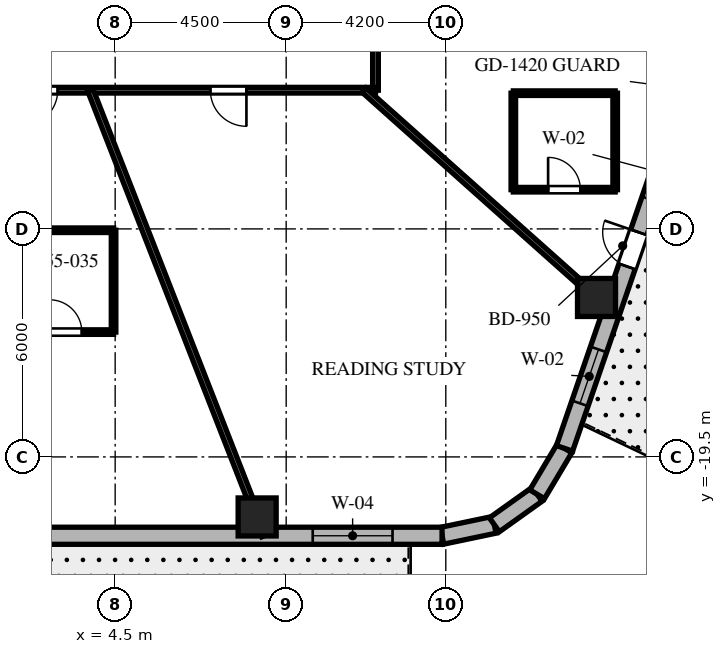
"""IFC4 building model, lengths in metres.
Left out: names, types, materials, properties, quantities, classifications, styles, units other than length and angle.
Written with IfcOpenShell. Run it as: python <this file> out.ifc"""

import sys

from ifc_helpers import new_model, si_unit, direction, frame, frame_2d, origin, origin_2d, place, context, subcontext, project, spatial, rectangle, extrude, element, fill, save


model = new_model("IFC4")
c1 = context("Model", 3, precision=1e-05, world=origin(), true_north=direction((0.0, 1.0)))
c2 = subcontext(c1, "Body", "Model", "MODEL_VIEW")
j1 = project(units=[si_unit("LENGTHUNIT", "METRE"), si_unit("PLANEANGLEUNIT", "RADIAN")], contexts=[c1])
p1 = place(None, origin())
s1 = spatial("IfcSite", under=j1, at=p1, CompositionType="ELEMENT")
p2 = place(p1, origin())
s2 = spatial("IfcBuilding", under=s1, at=p2, CompositionType="ELEMENT")
p3 = place(p2, frame((0.0, 0.0, 221.7)))
s3 = spatial("IfcBuildingStorey", under=s2, at=p3, CompositionType="ELEMENT", Elevation=221.7)
for number, where, z_axis, x_axis in (
    (1, (8.236, -21.08, 0.0), (0.0, 0.0, 1.0), (1.0, 0.0, 0.0)),
    (2, (17.166, -15.304, 0.0), (0.0, 0.0, 1.0), (1.0, 0.0, 0.0)),
):
    element("IfcColumn", number, at=place(p3, frame(where, z_axis=z_axis, x_axis=x_axis)), inside=s3, PredefinedType="COLUMN", context=c2, shape_type="SweptSolid", body=[
        extrude(rectangle(XDim=1.0, YDim=1.0, at=origin_2d()), origin(), (0.0, 0.0, 1.0), 3.8),
    ])
p4 = place(p3, frame((13.102, -21.575, 0.0), z_axis=(0.0, 0.0, 1.0), x_axis=(0.978757421505, 0.205021730188, 0.0)))
e3 = element("IfcWall", 3, at=p4, inside=s3, PredefinedType="SOLIDWALL", context=c2, shape_type="SweptSolid", body=[
    extrude(rectangle(XDim=1.406, YDim=0.45, at=frame_2d((0.703, 0.0))), origin(), (0.0, 0.0, 1.0), 3.5),
])
p5 = place(p3, frame((14.478, -21.287, 0.0), z_axis=(0.0, 0.0, 1.0), x_axis=(0.813888518617, 0.58102106611, 0.0)))
e4 = element("IfcWall", 4, at=p5, inside=s3, PredefinedType="SOLIDWALL", context=c2, shape_type="SweptSolid", body=[
    extrude(rectangle(XDim=1.383, YDim=0.45, at=frame_2d((0.691, 0.0))), origin(), (0.0, 0.0, 1.0), 3.5),
])
p6 = place(p3, frame((15.604, -20.483, 0.0), z_axis=(0.0, 0.0, 1.0), x_axis=(0.512222149036, 0.858852996756, 0.0)))
e5 = element("IfcWall", 5, at=p6, inside=s3, PredefinedType="SOLIDWALL", context=c2, shape_type="SweptSolid", body=[
    extrude(rectangle(XDim=1.406, YDim=0.45, at=frame_2d((0.703, 0.0))), origin(), (0.0, 0.0, 1.0), 3.5),
])
p7 = place(p3, frame((-11.298, -21.575, 0.0), z_axis=(0.0, 0.0, 1.0), x_axis=(1.0, 0.0, 0.0)))
e6 = element("IfcWall", 6, at=p7, inside=s3, PredefinedType="SOLIDWALL", context=c2, shape_type="SweptSolid", body=[
    extrude(rectangle(XDim=24.399, YDim=0.45, at=frame_2d((12.2, 0.0))), origin(), (0.0, 0.0, 1.0), 3.5),
])
p8 = place(p7, frame((2.55, 0.0, 0.0)))
e7 = element("IfcOpeningElement", 7, at=p8, cuts=e6, PredefinedType="OPENING", context=c2, shape_type="SweptSolid", body=[
    extrude(rectangle(XDim=1.0, YDim=2.15, at=frame_2d((0.5, 1.075))), frame((0.0, 0.235, 0.0), z_axis=(0.0, -1.0, 0.0), x_axis=(1.0, 0.0, 0.0)), (0.0, 0.0, 1.0), 0.47),
])
p9 = place(p7, frame((11.151, 0.0, 0.8)))
e8 = element("IfcOpeningElement", 8, at=p9, cuts=e6, PredefinedType="OPENING", context=c2, shape_type="SweptSolid", body=[
    extrude(rectangle(XDim=2.1, YDim=1.85, at=frame_2d((1.05, 0.925))), frame((0.0, 0.235, 0.0), z_axis=(0.0, -1.0, 0.0), x_axis=(1.0, 0.0, 0.0)), (0.0, 0.0, 1.0), 0.47),
])
p10 = place(p7, frame((20.996, 0.0, 0.8)))
e9 = element("IfcOpeningElement", 9, at=p10, cuts=e6, PredefinedType="OPENING", context=c2, shape_type="SweptSolid", body=[
    extrude(rectangle(XDim=2.1, YDim=1.85, at=frame_2d((1.05, 0.925))), frame((0.0, 0.235, 0.0), z_axis=(0.0, -1.0, 0.0), x_axis=(1.0, 0.0, 0.0)), (0.0, 0.0, 1.0), 0.47),
])
p11 = place(p3, frame((16.324, -19.275, 0.0), z_axis=(0.0, 0.0, 1.0), x_axis=(0.325083142304, 0.945685439557, 0.0)))
e10 = element("IfcWall", 10, at=p11, inside=s3, PredefinedType="SOLIDWALL", context=c2, shape_type="SweptSolid", body=[
    extrude(rectangle(XDim=20.224, YDim=0.45, at=frame_2d((10.112, 0.0))), origin(), (0.0, 0.0, 1.0), 3.5),
])
p12 = place(p11, frame((5.062, 0.0, 0.0)))
e11 = element("IfcOpeningElement", 11, at=p12, cuts=e10, PredefinedType="OPENING", context=c2, shape_type="SweptSolid", body=[
    extrude(rectangle(XDim=0.95, YDim=2.15, at=frame_2d((0.475, 1.075))), frame((0.0, 0.235, 0.0), z_axis=(0.0, -1.0, 0.0), x_axis=(1.0, 0.0, 0.0)), (0.0, 0.0, 1.0), 0.47),
])
p13 = place(p11, frame((1.253, 0.0, 0.8)))
e12 = element("IfcOpeningElement", 12, at=p13, cuts=e10, PredefinedType="OPENING", context=c2, shape_type="SweptSolid", body=[
    extrude(rectangle(XDim=1.5, YDim=1.8, at=frame_2d((0.75, 0.9))), frame((0.0, 0.235, 0.0), z_axis=(0.0, -1.0, 0.0), x_axis=(1.0, 0.0, 0.0)), (0.0, 0.0, 1.0), 0.47),
])
p14 = place(p11, frame((6.929, 0.0, 0.8)))
e13 = element("IfcOpeningElement", 13, at=p14, cuts=e10, PredefinedType="OPENING", context=c2, shape_type="SweptSolid", body=[
    extrude(rectangle(XDim=1.5, YDim=1.8, at=frame_2d((0.75, 0.9))), frame((0.0, 0.235, 0.0), z_axis=(0.0, -1.0, 0.0), x_axis=(1.0, 0.0, 0.0)), (0.0, 0.0, 1.0), 0.47),
])
p15 = place(p11, frame((12.612, 0.0, 0.8)))
e14 = element("IfcOpeningElement", 14, at=p15, cuts=e10, PredefinedType="OPENING", context=c2, shape_type="SweptSolid", body=[
    extrude(rectangle(XDim=1.5, YDim=1.8, at=frame_2d((0.75, 0.9))), frame((0.0, 0.235, 0.0), z_axis=(0.0, -1.0, 0.0), x_axis=(1.0, 0.0, 0.0)), (0.0, 0.0, 1.0), 0.47),
])
p16 = place(p11, frame((17.418, 0.0, 0.8)))
e15 = element("IfcOpeningElement", 15, at=p16, cuts=e10, PredefinedType="OPENING", context=c2, shape_type="SweptSolid", body=[
    extrude(rectangle(XDim=1.5, YDim=1.8, at=frame_2d((0.75, 0.9))), frame((0.0, 0.235, 0.0), z_axis=(0.0, -1.0, 0.0), x_axis=(1.0, 0.0, 0.0)), (0.0, 0.0, 1.0), 0.47),
])
p17 = place(p3, frame((11.35, -4.4, 0.0), z_axis=(0.0, 0.0, 1.0), x_axis=(0.0, -1.0, 0.0)))
e16 = element("IfcWall", 16, at=p17, inside=s3, PredefinedType="PARTITIONING", context=c2, shape_type="SweptSolid", body=[
    extrude(rectangle(XDim=5.45, YDim=0.15, at=frame_2d((2.725, 0.0))), origin(), (0.0, 0.0, 1.0), 2.99),
])
p18 = place(p17, frame((2.466, 0.0, 0.0)))
e17 = element("IfcOpeningElement", 17, at=p18, cuts=e16, PredefinedType="OPENING", context=c2, shape_type="SweptSolid", body=[
    extrude(rectangle(XDim=0.95, YDim=2.03, at=frame_2d((0.475, 1.015))), frame((0.0, 0.085, 0.0), z_axis=(0.0, -1.0, 0.0), x_axis=(1.0, 0.0, 0.0)), (0.0, 0.0, 1.0), 0.17),
])
p19 = place(p3, frame((11.35, -9.85, 0.0), z_axis=(0.0, 0.0, 1.0), x_axis=(-1.0, 0.0, 0.0)))
e18 = element("IfcWall", 18, at=p19, inside=s3, PredefinedType="PARTITIONING", context=c2, shape_type="SweptSolid", body=[
    extrude(rectangle(XDim=10.43, YDim=0.15, at=frame_2d((5.215, 0.0))), origin(), (0.0, 0.0, 1.0), 2.99),
])
p20 = place(p19, frame((8.362, 0.0, 0.0)))
e19 = element("IfcOpeningElement", 19, at=p20, cuts=e18, PredefinedType="OPENING", context=c2, shape_type="SweptSolid", body=[
    extrude(rectangle(XDim=0.95, YDim=2.03, at=frame_2d((0.475, 1.015))), frame((0.0, 0.085, 0.0), z_axis=(0.0, -1.0, 0.0), x_axis=(1.0, 0.0, 0.0)), (0.0, 0.0, 1.0), 0.17),
])
p21 = place(p19, frame((3.396, 0.0, 0.0)))
e20 = element("IfcOpeningElement", 20, at=p21, cuts=e18, PredefinedType="OPENING", context=c2, shape_type="SweptSolid", body=[
    extrude(rectangle(XDim=0.95, YDim=2.03, at=frame_2d((0.475, 1.015))), frame((0.0, 0.085, 0.0), z_axis=(0.0, -1.0, 0.0), x_axis=(1.0, 0.0, 0.0)), (0.0, 0.0, 1.0), 0.17),
])
p22 = place(p3, frame((3.848, -9.85, 0.0), z_axis=(0.0, 0.0, 1.0), x_axis=(0.363921778212, -0.931429513889, 0.0)))
e21 = element("IfcWall", 21, at=p22, inside=s3, PredefinedType="PARTITIONING", context=c2, shape_type="SweptSolid", body=[
    extrude(rectangle(XDim=12.588, YDim=0.15, at=frame_2d((6.294, 0.0))), origin(), (0.0, 0.0, 1.0), 2.74),
])
p23 = place(p3, frame((11.048, -9.85, 0.0), z_axis=(0.0, 0.0, 1.0), x_axis=(0.746444434655, -0.665447748492, 0.0)))
e22 = element("IfcWall", 22, at=p23, inside=s3, PredefinedType="PARTITIONING", context=c2, shape_type="SweptSolid", body=[
    extrude(rectangle(XDim=8.732, YDim=0.15, at=frame_2d((4.366, 0.0))), origin(), (0.0, 0.0, 1.0), 2.74),
])
p24 = place(p3, frame((11.35, -5.072, 0.0), z_axis=(0.0, 0.0, 1.0), x_axis=(0.912980177983, -0.408003914944, 0.0)))
e23 = element("IfcWall", 23, at=p24, inside=s3, PredefinedType="PARTITIONING", context=c2, shape_type="SweptSolid", body=[
    extrude(rectangle(XDim=9.358, YDim=0.15, at=frame_2d((4.679, 0.0))), origin(), (0.0, 0.0, 1.0), 2.74),
])
p25 = place(p3, frame((1.938, -16.215, 0.0), z_axis=(0.0, 0.0, 1.0), x_axis=(1.0, 0.0, 0.0)))
e24 = element("IfcWall", 24, at=p25, inside=s3, PredefinedType="PARTITIONING", context=c2, shape_type="SweptSolid", body=[
    extrude(rectangle(XDim=2.52, YDim=0.12, at=frame_2d((1.26, 0.0))), origin(), (0.0, 0.0, 1.0), 3.5),
])
p26 = place(p25, frame((0.835, 0.0, 0.0)))
e25 = element("IfcOpeningElement", 25, at=p26, cuts=e24, PredefinedType="OPENING", context=c2, shape_type="SweptSolid", body=[
    extrude(rectangle(XDim=0.85, YDim=2.03, at=frame_2d((0.425, 1.015))), frame((0.0, 0.07, 0.0), z_axis=(0.0, -1.0, 0.0), x_axis=(1.0, 0.0, 0.0)), (0.0, 0.0, 1.0), 0.14),
])
p27 = place(p3, frame((4.458, -16.215, 0.0), z_axis=(0.0, 0.0, 1.0), x_axis=(0.0, 1.0, 0.0)))
e26 = element("IfcWall", 26, at=p27, inside=s3, PredefinedType="PARTITIONING", context=c2, shape_type="SweptSolid", body=[
    extrude(rectangle(XDim=2.68, YDim=0.12, at=frame_2d((1.34, 0.0))), origin(), (0.0, 0.0, 1.0), 3.027),
])
p28 = place(p3, frame((4.458, -13.535, 0.0), z_axis=(0.0, 0.0, 1.0), x_axis=(-1.0, 0.0, 0.0)))
e27 = element("IfcWall", 27, at=p28, inside=s3, PredefinedType="PARTITIONING", context=c2, shape_type="SweptSolid", body=[
    extrude(rectangle(XDim=2.52, YDim=0.12, at=frame_2d((1.26, 0.0))), origin(), (0.0, 0.0, 1.0), 3.027),
])
p29 = place(p3, frame((14.977, -12.468, 0.0), z_axis=(0.0, 0.0, 1.0), x_axis=(1.0, 0.0, 0.0)))
e28 = element("IfcWall", 28, at=p29, inside=s3, PredefinedType="PARTITIONING", context=c2, shape_type="SweptSolid", body=[
    extrude(rectangle(XDim=2.68, YDim=0.12, at=frame_2d((1.34, 0.0))), origin(), (0.0, 0.0, 1.0), 3.5),
])
p30 = place(p29, frame((0.915, 0.0, 0.0)))
e29 = element("IfcOpeningElement", 29, at=p30, cuts=e28, PredefinedType="OPENING", context=c2, shape_type="SweptSolid", body=[
    extrude(rectangle(XDim=0.85, YDim=2.03, at=frame_2d((0.425, 1.015))), frame((0.0, 0.07, 0.0), z_axis=(0.0, -1.0, 0.0), x_axis=(1.0, 0.0, 0.0)), (0.0, 0.0, 1.0), 0.14),
])
p31 = place(p3, frame((17.657, -12.468, 0.0), z_axis=(0.0, 0.0, 1.0), x_axis=(0.0, 1.0, 0.0)))
e30 = element("IfcWall", 30, at=p31, inside=s3, PredefinedType="PARTITIONING", context=c2, shape_type="SweptSolid", body=[
    extrude(rectangle(XDim=2.54, YDim=0.12, at=frame_2d((1.27, 0.0))), origin(), (0.0, 0.0, 1.0), 3.5),
])
p32 = place(p3, frame((17.657, -9.928, 0.0), z_axis=(0.0, 0.0, 1.0), x_axis=(-1.0, 0.0, 0.0)))
e31 = element("IfcWall", 31, at=p32, inside=s3, PredefinedType="PARTITIONING", context=c2, shape_type="SweptSolid", body=[
    extrude(rectangle(XDim=2.68, YDim=0.12, at=frame_2d((1.34, 0.0))), origin(), (0.0, 0.0, 1.0), 3.073),
])
p33 = place(p3, frame((14.977, -9.928, 0.0), z_axis=(0.0, 0.0, 1.0), x_axis=(0.0, -1.0, 0.0)))
e32 = element("IfcWall", 32, at=p33, inside=s3, PredefinedType="PARTITIONING", context=c2, shape_type="SweptSolid", body=[
    extrude(rectangle(XDim=2.54, YDim=0.12, at=frame_2d((1.27, 0.0))), origin(), (0.0, 0.0, 1.0), 3.073),
])
p34 = place(p10, origin())
e33 = element("IfcWindow", 33, at=p34, inside=s3, PartitioningType="SINGLE_PANEL", PredefinedType="WINDOW", context=c2, shape_type="SweptSolid", body=[
    extrude(rectangle(XDim=2.1, YDim=1.85, at=frame_2d((1.05, 0.925))), frame((0.0, 0.03, 0.0), z_axis=(0.0, -1.0, 0.0), x_axis=(1.0, 0.0, 0.0)), (0.0, 0.0, 1.0), 0.06),
])
fill(e9, e33)
p35 = place(p12, origin())
e34 = element("IfcDoor", 34, at=p35, inside=s3, OperationType="SINGLE_SWING_RIGHT", PredefinedType="DOOR", context=c2, shape_type="SweptSolid", body=[
    extrude(rectangle(XDim=0.95, YDim=2.15, at=frame_2d((0.475, 1.075))), frame((0.0, 0.025, 0.0), z_axis=(0.0, -1.0, 0.0), x_axis=(1.0, 0.0, 0.0)), (0.0, 0.0, 1.0), 0.05),
])
fill(e11, e34)
p36 = place(p13, origin())
e35 = element("IfcWindow", 35, at=p36, inside=s3, PartitioningType="SINGLE_PANEL", PredefinedType="WINDOW", context=c2, shape_type="SweptSolid", body=[
    extrude(rectangle(XDim=1.5, YDim=1.8, at=frame_2d((0.75, 0.9))), frame((0.0, 0.03, 0.0), z_axis=(0.0, -1.0, 0.0), x_axis=(1.0, 0.0, 0.0)), (0.0, 0.0, 1.0), 0.06),
])
fill(e12, e35)
p37 = place(p20, origin())
e36 = element("IfcDoor", 36, at=p37, inside=s3, OperationType="SINGLE_SWING_RIGHT", PredefinedType="DOOR", context=c2, shape_type="SweptSolid", body=[
    extrude(rectangle(XDim=0.95, YDim=2.03, at=frame_2d((0.475, 1.015))), frame((0.0, 0.025, 0.0), z_axis=(0.0, -1.0, 0.0), x_axis=(1.0, 0.0, 0.0)), (0.0, 0.0, 1.0), 0.05),
])
fill(e19, e36)
p38 = place(p26, origin())
e37 = element("IfcDoor", 37, at=p38, inside=s3, OperationType="SINGLE_SWING_LEFT", PredefinedType="DOOR", context=c2, shape_type="SweptSolid", body=[
    extrude(rectangle(XDim=0.85, YDim=2.03, at=frame_2d((0.425, 1.015))), frame((0.0, 0.025, 0.0), z_axis=(0.0, -1.0, 0.0), x_axis=(1.0, 0.0, 0.0)), (0.0, 0.0, 1.0), 0.05),
])
fill(e25, e37)
p39 = place(p21, origin())
e38 = element("IfcDoor", 38, at=p39, inside=s3, OperationType="SINGLE_SWING_LEFT", PredefinedType="DOOR", context=c2, shape_type="SweptSolid", body=[
    extrude(rectangle(XDim=0.95, YDim=2.03, at=frame_2d((0.475, 1.015))), frame((0.0, 0.025, 0.0), z_axis=(0.0, -1.0, 0.0), x_axis=(1.0, 0.0, 0.0)), (0.0, 0.0, 1.0), 0.05),
])
fill(e20, e38)
p40 = place(p30, origin())
e39 = element("IfcDoor", 39, at=p40, inside=s3, OperationType="SINGLE_SWING_LEFT", PredefinedType="DOOR", context=c2, shape_type="SweptSolid", body=[
    extrude(rectangle(XDim=0.85, YDim=2.03, at=frame_2d((0.425, 1.015))), frame((0.0, 0.025, 0.0), z_axis=(0.0, -1.0, 0.0), x_axis=(1.0, 0.0, 0.0)), (0.0, 0.0, 1.0), 0.05),
])
fill(e29, e39)
save(model, sys.argv[1])
